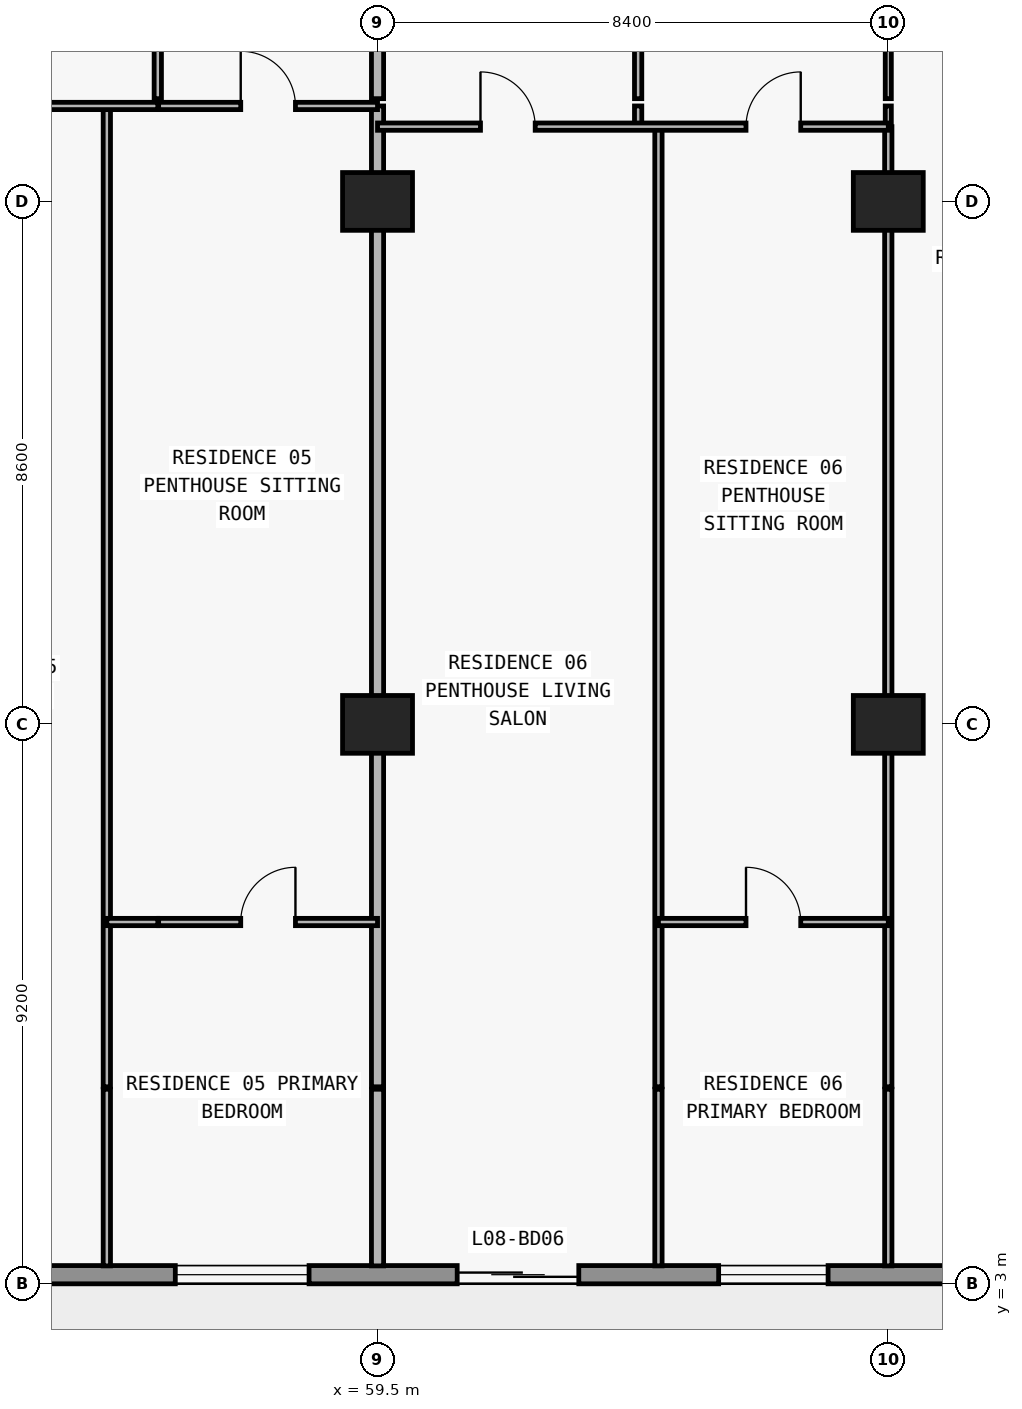
"""IFC4 building model, lengths in metres.
Left out: names, types, materials, properties, quantities, classifications, styles, units other than length and angle.
Written with IfcOpenShell. Run it as: python <this file> out.ifc"""

import sys

from ifc_helpers import new_model, si_unit, direction, frame, frame_2d, origin, origin_2d, place, context, subcontext, project, spatial, rectangle, extrude, element, fill, save


model = new_model("IFC4")
c1 = context("Model", 3, precision=1e-05, world=origin(), true_north=direction((0.0, 1.0)))
c2 = subcontext(c1, "Body", "Model", "MODEL_VIEW")
j1 = project(units=[si_unit("LENGTHUNIT", "METRE"), si_unit("PLANEANGLEUNIT", "RADIAN")], contexts=[c1])
p1 = place(None, origin())
s1 = spatial("IfcSite", under=j1, at=p1, CompositionType="ELEMENT")
p2 = place(p1, origin())
s2 = spatial("IfcBuilding", under=s1, at=p2, CompositionType="ELEMENT")
p3 = place(p2, frame((0.0, 0.0, 36.6)))
s3 = spatial("IfcBuildingStorey", under=s2, at=p3, CompositionType="ELEMENT", Elevation=36.6)
for number, where, z_axis, x_axis in (
    (1, (59.5, 12.2, 0.0), (0.0, 0.0, 1.0), (1.0, 0.0, 0.0)),
    (2, (67.9, 12.2, 0.0), (0.0, 0.0, 1.0), (1.0, 0.0, 0.0)),
    (3, (59.5, 20.8, 0.0), (0.0, 0.0, 1.0), (1.0, 0.0, 0.0)),
    (4, (67.9, 20.8, 0.0), (0.0, 0.0, 1.0), (1.0, 0.0, 0.0)),
):
    element("IfcColumn", number, at=place(p3, frame(where, z_axis=z_axis, x_axis=x_axis)), inside=s3, PredefinedType="COLUMN", context=c2, shape_type="SweptSolid", body=[
        extrude(rectangle(XDim=1.15, YDim=0.95, at=origin_2d()), origin(), (0.0, 0.0, 1.0), 3.05),
    ])
p4 = place(p3, frame((72.7, 3.15, 0.0), z_axis=(0.0, 0.0, 1.0), x_axis=(-1.0, 0.0, 0.0)))
e5 = element("IfcWall", 5, at=p4, inside=s3, PredefinedType="STANDARD", context=c2, shape_type="SweptSolid", body=[
    extrude(rectangle(XDim=67.6, YDim=0.3, at=frame_2d((33.8, 0.0))), origin(), (0.0, 0.0, 1.0), 3.05),
])
p5 = place(p4, frame((59.826, 0.0, 0.0)))
e6 = element("IfcOpeningElement", 6, at=p5, cuts=e5, PredefinedType="OPENING", context=c2, shape_type="SweptSolid", body=[
    extrude(rectangle(XDim=2.0, YDim=2.3, at=frame_2d((1.0, 1.15))), frame((0.0, 0.16, 0.0), z_axis=(0.0, -1.0, 0.0), x_axis=(1.0, 0.0, 0.0)), (0.0, 0.0, 1.0), 0.32),
])
p6 = place(p4, frame((55.526, 0.0, 0.85)))
e7 = element("IfcOpeningElement", 7, at=p6, cuts=e5, PredefinedType="OPENING", context=c2, shape_type="SweptSolid", body=[
    extrude(rectangle(XDim=2.2, YDim=1.55, at=frame_2d((1.1, 0.775))), frame((0.0, 0.16, 0.0), z_axis=(0.0, -1.0, 0.0), x_axis=(1.0, 0.0, 0.0)), (0.0, 0.0, 1.0), 0.32),
])
p7 = place(p4, frame((51.09, 0.0, 0.0)))
e8 = element("IfcOpeningElement", 8, at=p7, cuts=e5, PredefinedType="OPENING", context=c2, shape_type="SweptSolid", body=[
    extrude(rectangle(XDim=2.0, YDim=2.3, at=frame_2d((1.0, 1.15))), frame((0.0, 0.16, 0.0), z_axis=(0.0, -1.0, 0.0), x_axis=(1.0, 0.0, 0.0)), (0.0, 0.0, 1.0), 0.32),
])
p8 = place(p4, frame((46.99, 0.0, 0.85)))
e9 = element("IfcOpeningElement", 9, at=p8, cuts=e5, PredefinedType="OPENING", context=c2, shape_type="SweptSolid", body=[
    extrude(rectangle(XDim=1.8, YDim=1.55, at=frame_2d((0.9, 0.775))), frame((0.0, 0.16, 0.0), z_axis=(0.0, -1.0, 0.0), x_axis=(1.0, 0.0, 0.0)), (0.0, 0.0, 1.0), 0.32),
])
p9 = place(p4, frame((43.026, 0.0, 0.0)))
e10 = element("IfcOpeningElement", 10, at=p9, cuts=e5, PredefinedType="OPENING", context=c2, shape_type="SweptSolid", body=[
    extrude(rectangle(XDim=2.0, YDim=2.3, at=frame_2d((1.0, 1.15))), frame((0.0, 0.16, 0.0), z_axis=(0.0, -1.0, 0.0), x_axis=(1.0, 0.0, 0.0)), (0.0, 0.0, 1.0), 0.32),
])
p10 = place(p4, frame((38.726, 0.0, 0.85)))
e11 = element("IfcOpeningElement", 11, at=p10, cuts=e5, PredefinedType="OPENING", context=c2, shape_type="SweptSolid", body=[
    extrude(rectangle(XDim=2.2, YDim=1.55, at=frame_2d((1.1, 0.775))), frame((0.0, 0.16, 0.0), z_axis=(0.0, -1.0, 0.0), x_axis=(1.0, 0.0, 0.0)), (0.0, 0.0, 1.0), 0.32),
])
p11 = place(p4, frame((34.69, 0.0, 0.0)))
e12 = element("IfcOpeningElement", 12, at=p11, cuts=e5, PredefinedType="OPENING", context=c2, shape_type="SweptSolid", body=[
    extrude(rectangle(XDim=2.0, YDim=2.3, at=frame_2d((1.0, 1.15))), frame((0.0, 0.16, 0.0), z_axis=(0.0, -1.0, 0.0), x_axis=(1.0, 0.0, 0.0)), (0.0, 0.0, 1.0), 0.32),
])
p12 = place(p4, frame((30.81, 0.0, 0.65)))
e13 = element("IfcOpeningElement", 13, at=p12, cuts=e5, PredefinedType="OPENING", context=c2, shape_type="SweptSolid", body=[
    extrude(rectangle(XDim=2.6, YDim=1.85, at=frame_2d((1.3, 0.925))), frame((0.0, 0.16, 0.0), z_axis=(0.0, -1.0, 0.0), x_axis=(1.0, 0.0, 0.0)), (0.0, 0.0, 1.0), 0.32),
])
p13 = place(p4, frame((24.7, 0.0, 0.85)))
e14 = element("IfcOpeningElement", 14, at=p13, cuts=e5, PredefinedType="OPENING", context=c2, shape_type="SweptSolid", body=[
    extrude(rectangle(XDim=2.2, YDim=1.55, at=frame_2d((1.1, 0.775))), frame((0.0, 0.16, 0.0), z_axis=(0.0, -1.0, 0.0), x_axis=(1.0, 0.0, 0.0)), (0.0, 0.0, 1.0), 0.32),
])
p14 = place(p4, frame((18.626, 0.0, 0.0)))
e15 = element("IfcOpeningElement", 15, at=p14, cuts=e5, PredefinedType="OPENING", context=c2, shape_type="SweptSolid", body=[
    extrude(rectangle(XDim=2.0, YDim=2.3, at=frame_2d((1.0, 1.15))), frame((0.0, 0.16, 0.0), z_axis=(0.0, -1.0, 0.0), x_axis=(1.0, 0.0, 0.0)), (0.0, 0.0, 1.0), 0.32),
])
p15 = place(p4, frame((14.326, 0.0, 0.85)))
e16 = element("IfcOpeningElement", 16, at=p15, cuts=e5, PredefinedType="OPENING", context=c2, shape_type="SweptSolid", body=[
    extrude(rectangle(XDim=2.2, YDim=1.55, at=frame_2d((1.1, 0.775))), frame((0.0, 0.16, 0.0), z_axis=(0.0, -1.0, 0.0), x_axis=(1.0, 0.0, 0.0)), (0.0, 0.0, 1.0), 0.32),
])
p16 = place(p4, frame((9.89, 0.0, 0.0)))
e17 = element("IfcOpeningElement", 17, at=p16, cuts=e5, PredefinedType="OPENING", context=c2, shape_type="SweptSolid", body=[
    extrude(rectangle(XDim=2.0, YDim=2.3, at=frame_2d((1.0, 1.15))), frame((0.0, 0.16, 0.0), z_axis=(0.0, -1.0, 0.0), x_axis=(1.0, 0.0, 0.0)), (0.0, 0.0, 1.0), 0.32),
])
p17 = place(p4, frame((5.79, 0.0, 0.85)))
e18 = element("IfcOpeningElement", 18, at=p17, cuts=e5, PredefinedType="OPENING", context=c2, shape_type="SweptSolid", body=[
    extrude(rectangle(XDim=1.8, YDim=1.55, at=frame_2d((0.9, 0.775))), frame((0.0, 0.16, 0.0), z_axis=(0.0, -1.0, 0.0), x_axis=(1.0, 0.0, 0.0)), (0.0, 0.0, 1.0), 0.32),
])
p18 = place(p3, frame((55.048, 3.295, 0.0), z_axis=(0.0, 0.0, 1.0), x_axis=(0.0, 1.0, 0.0)))
e19 = element("IfcWall", 19, at=p18, inside=s3, PredefinedType="PARTITIONING", context=c2, shape_type="SweptSolid", body=[
    extrude(rectangle(XDim=2.905, YDim=0.12, at=frame_2d((1.453, 0.0))), origin(), (0.0, 0.0, 1.0), 3.05),
])
p19 = place(p3, frame((55.048, 6.24, 0.0), z_axis=(0.0, 0.0, 1.0), x_axis=(0.0, 1.0, 0.0)))
e20 = element("IfcWall", 20, at=p19, inside=s3, PredefinedType="PARTITIONING", context=c2, shape_type="SweptSolid", body=[
    extrude(rectangle(XDim=16.13, YDim=0.12, at=frame_2d((8.065, 0.0))), origin(), (0.0, 0.0, 1.0), 3.05),
])
p20 = place(p3, frame((55.886, 22.49, 0.0), z_axis=(0.0, 0.0, 1.0), x_axis=(0.0, 1.0, 0.0)))
e21 = element("IfcWall", 21, at=p20, inside=s3, PredefinedType="PARTITIONING", context=c2, shape_type="SweptSolid", body=[
    extrude(rectangle(XDim=4.69, YDim=0.12, at=frame_2d((2.345, 0.0))), origin(), (0.0, 0.0, 1.0), 3.05),
])
p21 = place(p20, frame((1.895, 0.0, 0.0)))
e22 = element("IfcOpeningElement", 22, at=p21, cuts=e21, PredefinedType="OPENING", context=c2, shape_type="SweptSolid", body=[
    extrude(rectangle(XDim=0.9, YDim=2.15, at=frame_2d((0.45, 1.075))), frame((0.0, 0.07, 0.0), z_axis=(0.0, -1.0, 0.0), x_axis=(1.0, 0.0, 0.0)), (0.0, 0.0, 1.0), 0.14),
])
p22 = place(p3, frame((59.5, 3.295, 0.0), z_axis=(0.0, 0.0, 1.0), x_axis=(0.0, 1.0, 0.0)))
e23 = element("IfcWall", 23, at=p22, inside=s3, PredefinedType="PARTITIONING", context=c2, shape_type="SweptSolid", body=[
    extrude(rectangle(XDim=2.905, YDim=0.2, at=frame_2d((1.453, 0.0))), origin(), (0.0, 0.0, 1.0), 3.05),
])
p23 = place(p3, frame((59.5, 6.24, 0.0), z_axis=(0.0, 0.0, 1.0), x_axis=(0.0, 1.0, 0.0)))
e24 = element("IfcWall", 24, at=p23, inside=s3, PredefinedType="PARTITIONING", context=c2, shape_type="SweptSolid", body=[
    extrude(rectangle(XDim=16.13, YDim=0.2, at=frame_2d((8.065, 0.0))), origin(), (0.0, 0.0, 1.0), 2.11),
])
p24 = place(p3, frame((59.5, 22.49, 0.0), z_axis=(0.0, 0.0, 1.0), x_axis=(0.0, 1.0, 0.0)))
e25 = element("IfcWall", 25, at=p24, inside=s3, PredefinedType="PARTITIONING", context=c2, shape_type="SweptSolid", body=[
    extrude(rectangle(XDim=4.69, YDim=0.2, at=frame_2d((2.345, 0.0))), origin(), (0.0, 0.0, 1.0), 2.11),
])
p25 = place(p3, frame((63.786, 22.03, 0.0), z_axis=(0.0, 0.0, 1.0), x_axis=(0.0, 1.0, 0.0)))
e26 = element("IfcWall", 26, at=p25, inside=s3, PredefinedType="PARTITIONING", context=c2, shape_type="SweptSolid", body=[
    extrude(rectangle(XDim=0.34, YDim=0.12, at=frame_2d((0.17, 0.0))), origin(), (0.0, 0.0, 1.0), 3.05),
])
p26 = place(p3, frame((63.786, 22.49, 0.0), z_axis=(0.0, 0.0, 1.0), x_axis=(0.0, 1.0, 0.0)))
e27 = element("IfcWall", 27, at=p26, inside=s3, PredefinedType="PARTITIONING", context=c2, shape_type="SweptSolid", body=[
    extrude(rectangle(XDim=4.69, YDim=0.12, at=frame_2d((2.345, 0.0))), origin(), (0.0, 0.0, 1.0), 3.05),
])
p27 = place(p26, frame((1.895, 0.0, 0.0)))
e28 = element("IfcOpeningElement", 28, at=p27, cuts=e27, PredefinedType="OPENING", context=c2, shape_type="SweptSolid", body=[
    extrude(rectangle(XDim=0.9, YDim=2.15, at=frame_2d((0.45, 1.075))), frame((0.0, 0.07, 0.0), z_axis=(0.0, -1.0, 0.0), x_axis=(1.0, 0.0, 0.0)), (0.0, 0.0, 1.0), 0.14),
])
p28 = place(p3, frame((64.12, 3.295, 0.0), z_axis=(0.0, 0.0, 1.0), x_axis=(0.0, 1.0, 0.0)))
e29 = element("IfcWall", 29, at=p28, inside=s3, PredefinedType="PARTITIONING", context=c2, shape_type="SweptSolid", body=[
    extrude(rectangle(XDim=2.905, YDim=0.12, at=frame_2d((1.453, 0.0))), origin(), (0.0, 0.0, 1.0), 3.05),
])
p29 = place(p3, frame((64.12, 6.24, 0.0), z_axis=(0.0, 0.0, 1.0), x_axis=(0.0, 1.0, 0.0)))
e30 = element("IfcWall", 30, at=p29, inside=s3, PredefinedType="PARTITIONING", context=c2, shape_type="SweptSolid", body=[
    extrude(rectangle(XDim=15.79, YDim=0.12, at=frame_2d((7.895, 0.0))), origin(), (0.0, 0.0, 1.0), 3.05),
])
p30 = place(p3, frame((67.9, 3.295, 0.0), z_axis=(0.0, 0.0, 1.0), x_axis=(0.0, 1.0, 0.0)))
e31 = element("IfcWall", 31, at=p30, inside=s3, PredefinedType="PARTITIONING", context=c2, shape_type="SweptSolid", body=[
    extrude(rectangle(XDim=2.905, YDim=0.12, at=frame_2d((1.453, 0.0))), origin(), (0.0, 0.0, 1.0), 3.05),
])
p31 = place(p3, frame((67.9, 6.24, 0.0), z_axis=(0.0, 0.0, 1.0), x_axis=(0.0, 1.0, 0.0)))
e32 = element("IfcWall", 32, at=p31, inside=s3, PredefinedType="PARTITIONING", context=c2, shape_type="SweptSolid", body=[
    extrude(rectangle(XDim=15.79, YDim=0.12, at=frame_2d((7.895, 0.0))), origin(), (0.0, 0.0, 1.0), 2.11),
])
p32 = place(p3, frame((67.9, 22.035, 0.0), z_axis=(0.0, 0.0, 1.0), x_axis=(0.0, 1.0, 0.0)))
e33 = element("IfcWall", 33, at=p32, inside=s3, PredefinedType="MOVABLE", context=c2, shape_type="SweptSolid", body=[
    extrude(rectangle(XDim=0.335, YDim=0.1, at=frame_2d((0.167, 0.0))), origin(), (0.0, 0.0, 1.0), 2.11),
])
p33 = place(p3, frame((67.9, 22.49, 0.0), z_axis=(0.0, 0.0, 1.0), x_axis=(0.0, 1.0, 0.0)))
e34 = element("IfcWall", 34, at=p33, inside=s3, PredefinedType="MOVABLE", context=c2, shape_type="SweptSolid", body=[
    extrude(rectangle(XDim=4.69, YDim=0.1, at=frame_2d((2.345, 0.0))), origin(), (0.0, 0.0, 1.0), 2.11),
])
p34 = place(p33, frame((1.895, 0.0, 0.0)))
e35 = element("IfcOpeningElement", 35, at=p34, cuts=e34, PredefinedType="OPENING", context=c2, shape_type="SweptSolid", body=[
    extrude(rectangle(XDim=0.9, YDim=2.06, at=frame_2d((0.45, 1.03))), frame((0.0, 0.06, 0.0), z_axis=(0.0, -1.0, 0.0), x_axis=(1.0, 0.0, 0.0)), (0.0, 0.0, 1.0), 0.12),
])
p35 = place(p3, frame((55.048, 8.95, 0.0), z_axis=(0.0, 0.0, 1.0), x_axis=(1.0, 0.0, 0.0)))
e36 = element("IfcWall", 36, at=p35, inside=s3, PredefinedType="PARTITIONING", context=c2, shape_type="SweptSolid", body=[
    extrude(rectangle(XDim=0.838, YDim=0.12, at=frame_2d((0.419, 0.0))), origin(), (0.0, 0.0, 1.0), 3.05),
])
p36 = place(p3, frame((55.9, 8.95, 0.0), z_axis=(0.0, 0.0, 1.0), x_axis=(1.0, 0.0, 0.0)))
e37 = element("IfcWall", 37, at=p36, inside=s3, PredefinedType="PARTITIONING", context=c2, shape_type="SweptSolid", body=[
    extrude(rectangle(XDim=3.6, YDim=0.12, at=frame_2d((1.8, 0.0))), origin(), (0.0, 0.0, 1.0), 3.05),
])
p37 = place(p36, frame((1.35, 0.0, 0.0)))
e38 = element("IfcOpeningElement", 38, at=p37, cuts=e37, PredefinedType="OPENING", context=c2, shape_type="SweptSolid", body=[
    extrude(rectangle(XDim=0.9, YDim=2.15, at=frame_2d((0.45, 1.075))), frame((0.0, 0.07, 0.0), z_axis=(0.0, -1.0, 0.0), x_axis=(1.0, 0.0, 0.0)), (0.0, 0.0, 1.0), 0.14),
])
p38 = place(p3, frame((64.12, 8.95, 0.0), z_axis=(0.0, 0.0, 1.0), x_axis=(1.0, 0.0, 0.0)))
e39 = element("IfcWall", 39, at=p38, inside=s3, PredefinedType="PARTITIONING", context=c2, shape_type="SweptSolid", body=[
    extrude(rectangle(XDim=3.78, YDim=0.12, at=frame_2d((1.89, 0.0))), origin(), (0.0, 0.0, 1.0), 3.05),
])
p39 = place(p38, frame((1.44, 0.0, 0.0)))
e40 = element("IfcOpeningElement", 40, at=p39, cuts=e39, PredefinedType="OPENING", context=c2, shape_type="SweptSolid", body=[
    extrude(rectangle(XDim=0.9, YDim=2.15, at=frame_2d((0.45, 1.075))), frame((0.0, 0.07, 0.0), z_axis=(0.0, -1.0, 0.0), x_axis=(1.0, 0.0, 0.0)), (0.0, 0.0, 1.0), 0.14),
])
p40 = place(p3, frame((59.5, 22.03, 0.0), z_axis=(0.0, 0.0, 1.0), x_axis=(1.0, 0.0, 0.0)))
e41 = element("IfcWall", 41, at=p40, inside=s3, PredefinedType="PARTITIONING", context=c2, shape_type="SweptSolid", body=[
    extrude(rectangle(XDim=8.4, YDim=0.12, at=frame_2d((4.2, 0.0))), origin(), (0.0, 0.0, 1.0), 3.05),
])
p41 = place(p40, frame((1.693, 0.0, 0.0)))
e42 = element("IfcOpeningElement", 42, at=p41, cuts=e41, PredefinedType="OPENING", context=c2, shape_type="SweptSolid", body=[
    extrude(rectangle(XDim=0.9, YDim=2.15, at=frame_2d((0.45, 1.075))), frame((0.0, 0.07, 0.0), z_axis=(0.0, -1.0, 0.0), x_axis=(1.0, 0.0, 0.0)), (0.0, 0.0, 1.0), 0.14),
])
p42 = place(p40, frame((6.06, 0.0, 0.0)))
e43 = element("IfcOpeningElement", 43, at=p42, cuts=e41, PredefinedType="OPENING", context=c2, shape_type="SweptSolid", body=[
    extrude(rectangle(XDim=0.9, YDim=2.15, at=frame_2d((0.45, 1.075))), frame((0.0, 0.07, 0.0), z_axis=(0.0, -1.0, 0.0), x_axis=(1.0, 0.0, 0.0)), (0.0, 0.0, 1.0), 0.14),
])
p43 = place(p3, frame((51.37, 22.37, 0.0), z_axis=(0.0, 0.0, 1.0), x_axis=(1.0, 0.0, 0.0)))
e44 = element("IfcWall", 44, at=p43, inside=s3, PredefinedType="PARTITIONING", context=c2, shape_type="SweptSolid", body=[
    extrude(rectangle(XDim=4.516, YDim=0.12, at=frame_2d((2.258, 0.0))), origin(), (0.0, 0.0, 1.0), 3.05),
])
p44 = place(p43, frame((1.389, 0.0, 0.0)))
e45 = element("IfcOpeningElement", 45, at=p44, cuts=e44, PredefinedType="OPENING", context=c2, shape_type="SweptSolid", body=[
    extrude(rectangle(XDim=0.9, YDim=2.15, at=frame_2d((0.45, 1.075))), frame((0.0, 0.07, 0.0), z_axis=(0.0, -1.0, 0.0), x_axis=(1.0, 0.0, 0.0)), (0.0, 0.0, 1.0), 0.14),
])
p45 = place(p3, frame((55.9, 22.37, 0.0), z_axis=(0.0, 0.0, 1.0), x_axis=(1.0, 0.0, 0.0)))
e46 = element("IfcWall", 46, at=p45, inside=s3, PredefinedType="PARTITIONING", context=c2, shape_type="SweptSolid", body=[
    extrude(rectangle(XDim=3.6, YDim=0.12, at=frame_2d((1.8, 0.0))), origin(), (0.0, 0.0, 1.0), 3.05),
])
p46 = place(p45, frame((1.35, 0.0, 0.0)))
e47 = element("IfcOpeningElement", 47, at=p46, cuts=e46, PredefinedType="OPENING", context=c2, shape_type="SweptSolid", body=[
    extrude(rectangle(XDim=0.9, YDim=2.15, at=frame_2d((0.45, 1.075))), frame((0.0, 0.07, 0.0), z_axis=(0.0, -1.0, 0.0), x_axis=(1.0, 0.0, 0.0)), (0.0, 0.0, 1.0), 0.14),
])
p47 = place(p15, origin())
e48 = element("IfcWindow", 48, at=p47, inside=s3, PartitioningType="SINGLE_PANEL", PredefinedType="WINDOW", context=c2, shape_type="SweptSolid", body=[
    extrude(rectangle(XDim=2.2, YDim=1.55, at=frame_2d((1.1, 0.775))), frame((0.0, 0.03, 0.0), z_axis=(0.0, -1.0, 0.0), x_axis=(1.0, 0.0, 0.0)), (0.0, 0.0, 1.0), 0.06),
])
fill(e16, e48)
p48 = place(p16, origin())
e49 = element("IfcDoor", 49, at=p48, inside=s3, OperationType="DOUBLE_DOOR_SLIDING", PredefinedType="DOOR", context=c2, shape_type="SweptSolid", body=[
    extrude(rectangle(XDim=2.0, YDim=2.3, at=frame_2d((1.0, 1.15))), frame((0.0, 0.025, 0.0), z_axis=(0.0, -1.0, 0.0), x_axis=(1.0, 0.0, 0.0)), (0.0, 0.0, 1.0), 0.05),
])
fill(e17, e49)
p49 = place(p17, origin())
e50 = element("IfcWindow", 50, at=p49, inside=s3, PartitioningType="SINGLE_PANEL", PredefinedType="WINDOW", context=c2, shape_type="SweptSolid", body=[
    extrude(rectangle(XDim=1.8, YDim=1.55, at=frame_2d((0.9, 0.775))), frame((0.0, 0.03, 0.0), z_axis=(0.0, -1.0, 0.0), x_axis=(1.0, 0.0, 0.0)), (0.0, 0.0, 1.0), 0.06),
])
fill(e18, e50)
p50 = place(p46, origin())
e51 = element("IfcDoor", 51, at=p50, inside=s3, OperationType="SINGLE_SWING_LEFT", PredefinedType="DOOR", context=c2, shape_type="SweptSolid", body=[
    extrude(rectangle(XDim=0.9, YDim=2.15, at=frame_2d((0.45, 1.075))), frame((0.0, 0.025, 0.0), z_axis=(0.0, -1.0, 0.0), x_axis=(1.0, 0.0, 0.0)), (0.0, 0.0, 1.0), 0.05),
])
fill(e47, e51)
p51 = place(p37, origin())
e52 = element("IfcDoor", 52, at=p51, inside=s3, OperationType="SINGLE_SWING_RIGHT", PredefinedType="DOOR", context=c2, shape_type="SweptSolid", body=[
    extrude(rectangle(XDim=0.9, YDim=2.15, at=frame_2d((0.45, 1.075))), frame((0.0, 0.025, 0.0), z_axis=(0.0, -1.0, 0.0), x_axis=(1.0, 0.0, 0.0)), (0.0, 0.0, 1.0), 0.05),
])
fill(e38, e52)
p52 = place(p41, origin())
e53 = element("IfcDoor", 53, at=p52, inside=s3, OperationType="SINGLE_SWING_LEFT", PredefinedType="DOOR", context=c2, shape_type="SweptSolid", body=[
    extrude(rectangle(XDim=0.9, YDim=2.15, at=frame_2d((0.45, 1.075))), frame((0.0, 0.025, 0.0), z_axis=(0.0, -1.0, 0.0), x_axis=(1.0, 0.0, 0.0)), (0.0, 0.0, 1.0), 0.05),
])
fill(e42, e53)
p53 = place(p42, origin())
e54 = element("IfcDoor", 54, at=p53, inside=s3, OperationType="SINGLE_SWING_RIGHT", PredefinedType="DOOR", context=c2, shape_type="SweptSolid", body=[
    extrude(rectangle(XDim=0.9, YDim=2.15, at=frame_2d((0.45, 1.075))), frame((0.0, 0.025, 0.0), z_axis=(0.0, -1.0, 0.0), x_axis=(1.0, 0.0, 0.0)), (0.0, 0.0, 1.0), 0.05),
])
fill(e43, e54)
p54 = place(p39, origin())
e55 = element("IfcDoor", 55, at=p54, inside=s3, OperationType="SINGLE_SWING_LEFT", PredefinedType="DOOR", context=c2, shape_type="SweptSolid", body=[
    extrude(rectangle(XDim=0.9, YDim=2.15, at=frame_2d((0.45, 1.075))), frame((0.0, 0.025, 0.0), z_axis=(0.0, -1.0, 0.0), x_axis=(1.0, 0.0, 0.0)), (0.0, 0.0, 1.0), 0.05),
])
fill(e40, e55)
save(model, sys.argv[1])
